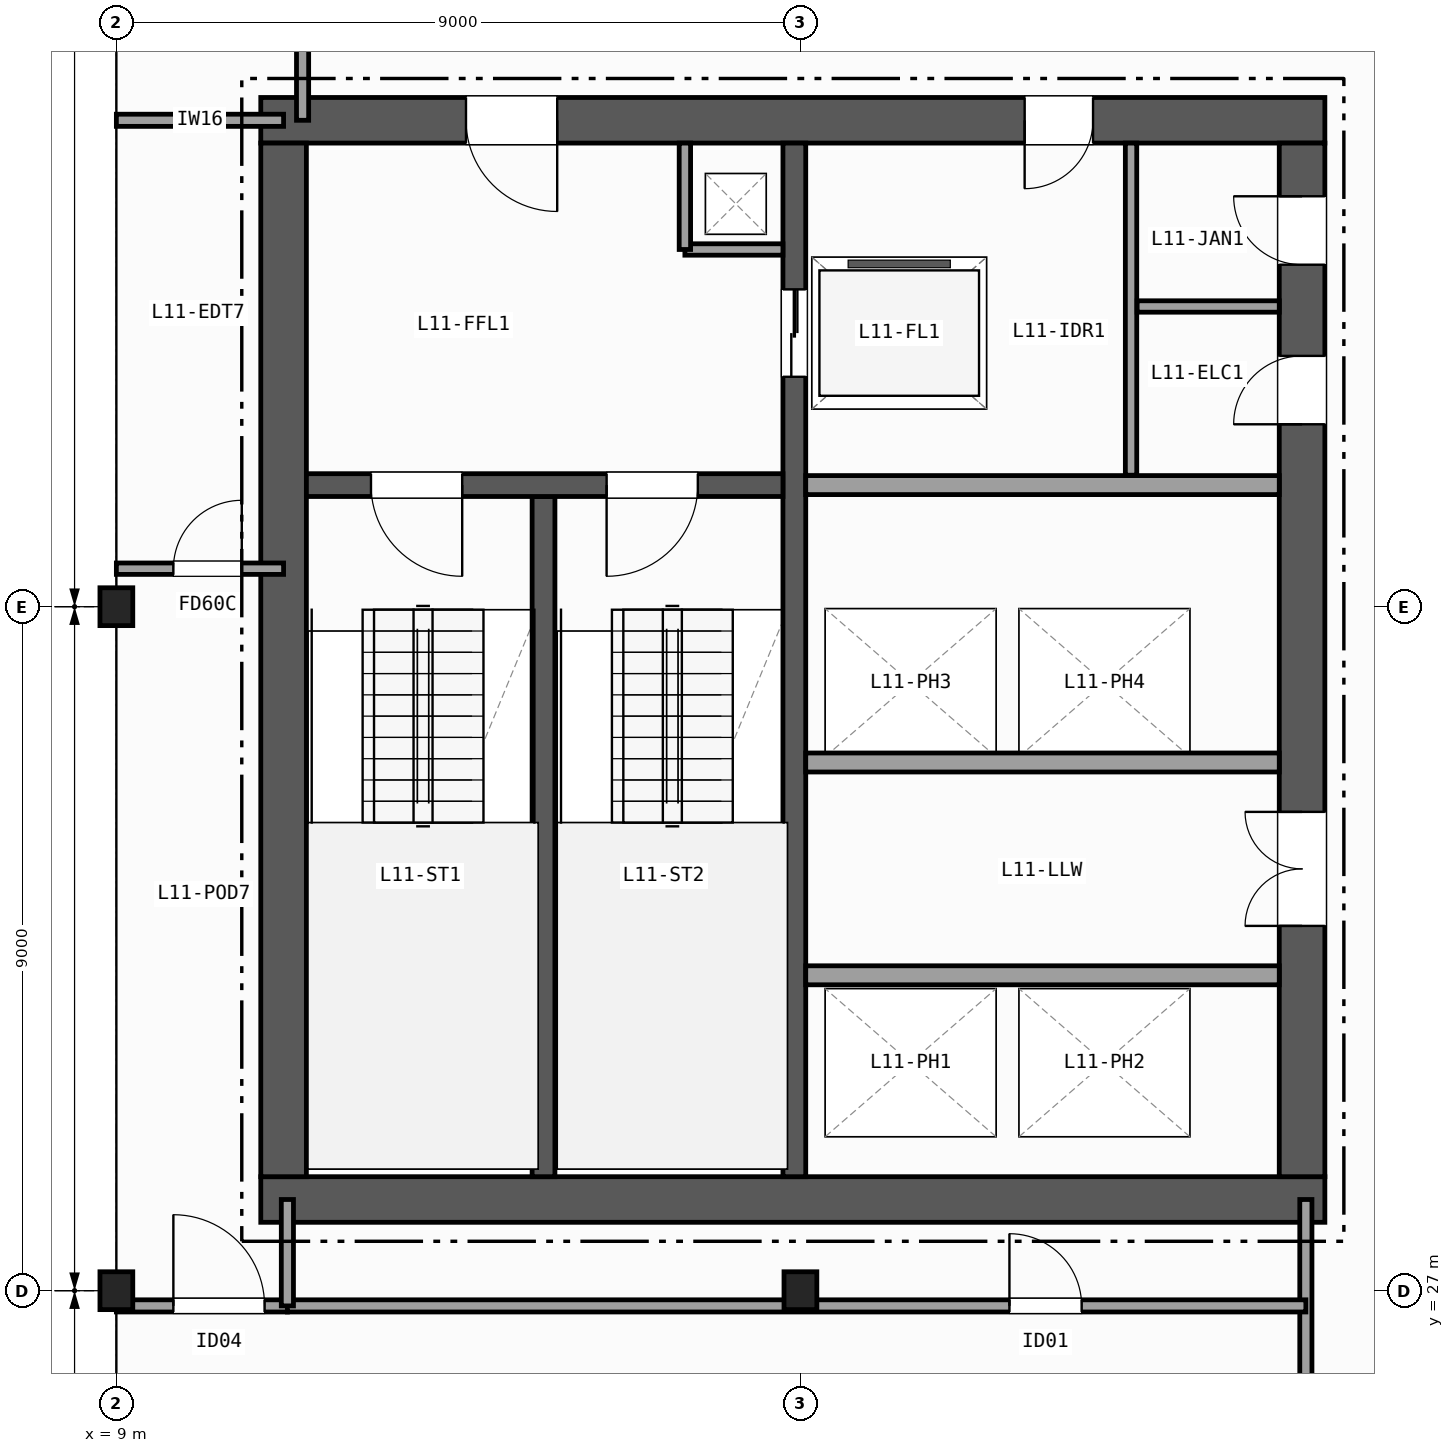
"""IFC4 building model, lengths in metres.
Left out: names, types, materials, properties, quantities, classifications, styles, units other than length and angle.
Written with IfcOpenShell. Run it as: python <this file> out.ifc"""

import sys

from ifc_helpers import new_model, si_unit, direction, frame, frame_2d, origin, origin_2d, place, context, subcontext, project, spatial, rectangle, i_section, extrude, element, fill, save


model = new_model("IFC4")
c1 = context("Model", 3, precision=1e-05, world=origin(), true_north=direction((0.0, 1.0)))
c2 = subcontext(c1, "Body", "Model", "MODEL_VIEW")
j1 = project(units=[si_unit("LENGTHUNIT", "METRE"), si_unit("PLANEANGLEUNIT", "RADIAN")], contexts=[c1])
p1 = place(None, origin())
s1 = spatial("IfcSite", under=j1, at=p1, CompositionType="ELEMENT")
p2 = place(p1, origin())
s2 = spatial("IfcBuilding", under=s1, at=p2, CompositionType="ELEMENT")
p3 = place(p2, frame((0.0, 0.0, 50.8)))
s3 = spatial("IfcBuildingStorey", under=s2, at=p3, CompositionType="ELEMENT", Elevation=50.8)
for number, where, z_axis, x_axis in (
    (1, (9.0, 27.0, 0.0), (0.0, 0.0, 1.0), (1.0, 0.0, 0.0)),
    (2, (9.0, 36.0, 0.0), (0.0, 0.0, 1.0), (1.0, 0.0, 0.0)),
    (3, (18.0, 27.0, 0.0), (0.0, 0.0, 1.0), (1.0, 0.0, 0.0)),
):
    element("IfcColumn", number, at=place(p3, frame(where, z_axis=z_axis, x_axis=x_axis)), inside=s3, PredefinedType="COLUMN", context=c2, shape_type="SweptSolid", body=[
        extrude(i_section(OverallWidth=0.432, OverallDepth=0.498, WebThickness=0.056, FlangeThickness=0.089, FilletRadius=0.015, at=origin_2d()), origin(), (0.0, 0.0, 1.0), 3.7),
    ])
p4 = place(p3, frame((10.9, 28.2, 0.0), z_axis=(0.0, 0.0, 1.0), x_axis=(1.0, 0.0, 0.0)))
e4 = element("IfcWall", 4, at=p4, inside=s3, PredefinedType="SHEAR", context=c2, shape_type="SweptSolid", body=[
    extrude(rectangle(XDim=14.0, YDim=0.6, at=frame_2d((7.0, 0.0))), origin(), (0.0, 0.0, 1.0), 3.42),
])
p5 = place(p3, frame((24.9, 42.4, 0.0), z_axis=(0.0, 0.0, 1.0), x_axis=(-1.0, 0.0, 0.0)))
e5 = element("IfcWall", 5, at=p5, inside=s3, PredefinedType="SHEAR", context=c2, shape_type="SweptSolid", body=[
    extrude(rectangle(XDim=14.0, YDim=0.6, at=frame_2d((7.0, 0.0))), origin(), (0.0, 0.0, 1.0), 3.42),
])
p6 = place(p5, frame((10.1, 0.0, 0.0)))
e6 = element("IfcOpeningElement", 6, at=p6, cuts=e5, PredefinedType="OPENING", context=c2, shape_type="SweptSolid", body=[
    extrude(rectangle(XDim=1.2, YDim=2.15, at=frame_2d((0.6, 1.075))), frame((0.0, 0.31, 0.0), z_axis=(0.0, -1.0, 0.0), x_axis=(1.0, 0.0, 0.0)), (0.0, 0.0, 1.0), 0.62),
])
p7 = place(p5, frame((3.05, 0.0, 0.0)))
e7 = element("IfcOpeningElement", 7, at=p7, cuts=e5, PredefinedType="OPENING", context=c2, shape_type="SweptSolid", body=[
    extrude(rectangle(XDim=0.9, YDim=2.1, at=frame_2d((0.45, 1.05))), frame((0.0, 0.31, 0.0), z_axis=(0.0, -1.0, 0.0), x_axis=(1.0, 0.0, 0.0)), (0.0, 0.0, 1.0), 0.62),
])
p8 = place(p3, frame((11.2, 42.1, 0.0), z_axis=(0.0, 0.0, 1.0), x_axis=(0.0, -1.0, 0.0)))
e8 = element("IfcWall", 8, at=p8, inside=s3, PredefinedType="SHEAR", context=c2, shape_type="SweptSolid", body=[
    extrude(rectangle(XDim=13.6, YDim=0.6, at=frame_2d((6.8, 0.0))), origin(), (0.0, 0.0, 1.0), 3.42),
])
p9 = place(p3, frame((24.6, 28.5, 0.0), z_axis=(0.0, 0.0, 1.0), x_axis=(0.0, 1.0, 0.0)))
e9 = element("IfcWall", 9, at=p9, inside=s3, PredefinedType="SHEAR", context=c2, shape_type="SweptSolid", body=[
    extrude(rectangle(XDim=13.6, YDim=0.6, at=frame_2d((6.8, 0.0))), origin(), (0.0, 0.0, 1.0), 3.42),
])
p10 = place(p9, frame((3.3, 0.0, 0.0)))
e10 = element("IfcOpeningElement", 10, at=p10, cuts=e9, PredefinedType="OPENING", context=c2, shape_type="SweptSolid", body=[
    extrude(rectangle(XDim=1.5, YDim=2.2, at=frame_2d((0.75, 1.1))), frame((0.0, 0.31, 0.0), z_axis=(0.0, -1.0, 0.0), x_axis=(1.0, 0.0, 0.0)), (0.0, 0.0, 1.0), 0.62),
])
p11 = place(p9, frame((9.9, 0.0, 0.0)))
e11 = element("IfcOpeningElement", 11, at=p11, cuts=e9, PredefinedType="OPENING", context=c2, shape_type="SweptSolid", body=[
    extrude(rectangle(XDim=0.9, YDim=2.1, at=frame_2d((0.45, 1.05))), frame((0.0, 0.31, 0.0), z_axis=(0.0, -1.0, 0.0), x_axis=(1.0, 0.0, 0.0)), (0.0, 0.0, 1.0), 0.62),
])
p12 = place(p9, frame((12.0, 0.0, 0.0)))
e12 = element("IfcOpeningElement", 12, at=p12, cuts=e9, PredefinedType="OPENING", context=c2, shape_type="SweptSolid", body=[
    extrude(rectangle(XDim=0.9, YDim=2.1, at=frame_2d((0.45, 1.05))), frame((0.0, 0.31, 0.0), z_axis=(0.0, -1.0, 0.0), x_axis=(1.0, 0.0, 0.0)), (0.0, 0.0, 1.0), 0.62),
])
p13 = place(p3, frame((14.62, 28.5, 0.0), z_axis=(0.0, 0.0, 1.0), x_axis=(0.0, 1.0, 0.0)))
e13 = element("IfcWall", 13, at=p13, inside=s3, PredefinedType="SHEAR", context=c2, shape_type="SweptSolid", body=[
    extrude(rectangle(XDim=8.95, YDim=0.3, at=frame_2d((4.475, 0.0))), origin(), (0.0, 0.0, 1.0), 3.42),
])
p14 = place(p3, frame((17.92, 42.1, 0.0), z_axis=(0.0, 0.0, 1.0), x_axis=(0.0, -1.0, 0.0)))
e14 = element("IfcWall", 14, at=p14, inside=s3, PredefinedType="SHEAR", context=c2, shape_type="SweptSolid", body=[
    extrude(rectangle(XDim=13.6, YDim=0.3, at=frame_2d((6.8, 0.0))), origin(), (0.0, 0.0, 1.0), 3.42),
])
p15 = place(p14, frame((1.925, 0.0, 0.0)))
e15 = element("IfcOpeningElement", 15, at=p15, cuts=e14, PredefinedType="OPENING", context=c2, shape_type="SweptSolid", body=[
    extrude(rectangle(XDim=1.15, YDim=2.15, at=frame_2d((0.575, 1.075))), frame((0.0, 0.16, 0.0), z_axis=(0.0, -1.0, 0.0), x_axis=(1.0, 0.0, 0.0)), (0.0, 0.0, 1.0), 0.32),
])
p16 = place(p3, frame((17.77, 37.6, 0.0), z_axis=(0.0, 0.0, 1.0), x_axis=(-1.0, 0.0, 0.0)))
e16 = element("IfcWall", 16, at=p16, inside=s3, PredefinedType="SHEAR", context=c2, shape_type="SweptSolid", body=[
    extrude(rectangle(XDim=6.27, YDim=0.3, at=frame_2d((3.135, 0.0))), origin(), (0.0, 0.0, 1.0), 3.42),
])
p17 = place(p16, frame((4.22, 0.0, 0.0)))
e17 = element("IfcOpeningElement", 17, at=p17, cuts=e16, PredefinedType="OPENING", context=c2, shape_type="SweptSolid", body=[
    extrude(rectangle(XDim=1.2, YDim=2.15, at=frame_2d((0.6, 1.075))), frame((0.0, 0.16, 0.0), z_axis=(0.0, -1.0, 0.0), x_axis=(1.0, 0.0, 0.0)), (0.0, 0.0, 1.0), 0.32),
])
p18 = place(p16, frame((1.12, 0.0, 0.0)))
e18 = element("IfcOpeningElement", 18, at=p18, cuts=e16, PredefinedType="OPENING", context=c2, shape_type="SweptSolid", body=[
    extrude(rectangle(XDim=1.2, YDim=2.15, at=frame_2d((0.6, 1.075))), frame((0.0, 0.16, 0.0), z_axis=(0.0, -1.0, 0.0), x_axis=(1.0, 0.0, 0.0)), (0.0, 0.0, 1.0), 0.32),
])
p19 = place(p3, frame((16.48, 40.7, 0.0), z_axis=(0.0, 0.0, 1.0), x_axis=(1.0, 0.0, 0.0)))
e19 = element("IfcWall", 19, at=p19, inside=s3, PredefinedType="PARTITIONING", context=c2, shape_type="SweptSolid", body=[
    extrude(rectangle(XDim=1.29, YDim=0.15, at=frame_2d((0.645, 0.0))), origin(), (0.0, 0.0, 1.0), 3.42),
])
p20 = place(p3, frame((16.48, 40.7, 0.0), z_axis=(0.0, 0.0, 1.0), x_axis=(0.0, 1.0, 0.0)))
e20 = element("IfcWall", 20, at=p20, inside=s3, PredefinedType="PARTITIONING", context=c2, shape_type="SweptSolid", body=[
    extrude(rectangle(XDim=1.4, YDim=0.15, at=frame_2d((0.7, 0.0))), origin(), (0.0, 0.0, 1.0), 3.42),
])
for number, where, z_axis, x_axis in (
    (21, (18.07, 37.6, 0.0), (0.0, 0.0, 1.0), (1.0, 0.0, 0.0)),
    (22, (18.07, 31.15, 0.0), (0.0, 0.0, 1.0), (1.0, 0.0, 0.0)),
    (23, (24.3, 33.95, 0.0), (0.0, 0.0, 1.0), (-1.0, 0.0, 0.0)),
):
    element("IfcWall", number, at=place(p3, frame(where, z_axis=z_axis, x_axis=x_axis)), inside=s3, PredefinedType="PARTITIONING", context=c2, shape_type="SweptSolid", body=[
        extrude(rectangle(XDim=6.23, YDim=0.25, at=frame_2d((3.115, 0.0))), origin(), (0.0, 0.0, 1.0), 3.42),
    ])
p21 = place(p3, frame((22.35, 37.73, 0.0), z_axis=(0.0, 0.0, 1.0), x_axis=(0.0, 1.0, 0.0)))
e24 = element("IfcWall", 24, at=p21, inside=s3, PredefinedType="PARTITIONING", context=c2, shape_type="SweptSolid", body=[
    extrude(rectangle(XDim=4.37, YDim=0.15, at=frame_2d((2.185, 0.0))), origin(), (0.0, 0.0, 1.0), 3.42),
])
p22 = place(p3, frame((22.43, 39.95, 0.0), z_axis=(0.0, 0.0, 1.0), x_axis=(1.0, 0.0, 0.0)))
e25 = element("IfcWall", 25, at=p22, inside=s3, PredefinedType="PARTITIONING", context=c2, shape_type="SweptSolid", body=[
    extrude(rectangle(XDim=1.87, YDim=0.15, at=frame_2d((0.935, 0.0))), origin(), (0.0, 0.0, 1.0), 3.42),
])
p23 = place(p3, frame((9.0, 26.8, 0.0), z_axis=(0.0, 0.0, 1.0), x_axis=(1.0, 0.0, 0.0)))
e26 = element("IfcWall", 26, at=p23, inside=s3, PredefinedType="PARTITIONING", context=c2, shape_type="SweptSolid", body=[
    extrude(rectangle(XDim=2.25, YDim=0.16, at=frame_2d((1.125, 0.0))), origin(), (0.0, 0.0, 1.0), 2.627),
])
p24 = place(p23, frame((0.75, 0.0, 0.0)))
e27 = element("IfcOpeningElement", 27, at=p24, cuts=e26, PredefinedType="OPENING", context=c2, shape_type="SweptSolid", body=[
    extrude(rectangle(XDim=1.2, YDim=2.15, at=frame_2d((0.6, 1.075))), frame((0.0, 0.09, 0.0), z_axis=(0.0, -1.0, 0.0), x_axis=(1.0, 0.0, 0.0)), (0.0, 0.0, 1.0), 0.18),
])
p25 = place(p3, frame((9.0, 42.4, 0.0), z_axis=(0.0, 0.0, 1.0), x_axis=(1.0, 0.0, 0.0)))
e28 = element("IfcWall", 28, at=p25, inside=s3, PredefinedType="PARTITIONING", context=c2, shape_type="SweptSolid", body=[
    extrude(rectangle(XDim=2.2, YDim=0.16, at=frame_2d((1.1, 0.0))), origin(), (0.0, 0.0, 1.0), 2.627),
])
p26 = place(p3, frame((11.45, 42.4, 0.0), z_axis=(0.0, 0.0, 1.0), x_axis=(0.0, 1.0, 0.0)))
e29 = element("IfcWall", 29, at=p26, inside=s3, PredefinedType="PARTITIONING", context=c2, shape_type="SweptSolid", body=[
    extrude(rectangle(XDim=2.1, YDim=0.16, at=frame_2d((1.05, 0.0))), origin(), (0.0, 0.0, 1.0), 3.42),
])
p27 = place(p3, frame((9.0, 36.5, 0.0), z_axis=(0.0, 0.0, 1.0), x_axis=(1.0, 0.0, 0.0)))
e30 = element("IfcWall", 30, at=p27, inside=s3, PredefinedType="PARTITIONING", context=c2, shape_type="SweptSolid", body=[
    extrude(rectangle(XDim=2.2, YDim=0.15, at=frame_2d((1.1, 0.0))), origin(), (0.0, 0.0, 1.0), 2.627),
])
p28 = place(p27, frame((0.75, 0.0, 0.0)))
e31 = element("IfcOpeningElement", 31, at=p28, cuts=e30, PredefinedType="OPENING", context=c2, shape_type="SweptSolid", body=[
    extrude(rectangle(XDim=0.9, YDim=2.1, at=frame_2d((0.45, 1.05))), frame((0.0, 0.085, 0.0), z_axis=(0.0, -1.0, 0.0), x_axis=(1.0, 0.0, 0.0)), (0.0, 0.0, 1.0), 0.17),
])
p29 = place(p3, frame((24.65, 9.0, 0.0), z_axis=(0.0, 0.0, 1.0), x_axis=(0.0, 1.0, 0.0)))
e32 = element("IfcWall", 32, at=p29, inside=s3, PredefinedType="PARTITIONING", context=c2, shape_type="SweptSolid", body=[
    extrude(rectangle(XDim=19.2, YDim=0.16, at=frame_2d((9.6, 0.0))), origin(), (0.0, 0.0, 1.0), 2.627),
])
p30 = place(p29, frame((12.2, 0.0, 0.0)))
e33 = element("IfcOpeningElement", 33, at=p30, cuts=e32, PredefinedType="OPENING", context=c2, shape_type="SweptSolid", body=[
    extrude(rectangle(XDim=1.0, YDim=2.1, at=frame_2d((0.5, 1.05))), frame((0.0, 0.09, 0.0), z_axis=(0.0, -1.0, 0.0), x_axis=(1.0, 0.0, 0.0)), (0.0, 0.0, 1.0), 0.18),
])
p31 = place(p29, frame((4.2, 0.0, 0.0)))
e34 = element("IfcOpeningElement", 34, at=p31, cuts=e32, PredefinedType="OPENING", context=c2, shape_type="SweptSolid", body=[
    extrude(rectangle(XDim=1.05, YDim=2.15, at=frame_2d((0.525, 1.075))), frame((0.0, 0.09, 0.0), z_axis=(0.0, -1.0, 0.0), x_axis=(1.0, 0.0, 0.0)), (0.0, 0.0, 1.0), 0.18),
])
p32 = place(p3, frame((11.25, 26.8, 0.0), z_axis=(0.0, 0.0, 1.0), x_axis=(1.0, 0.0, 0.0)))
e35 = element("IfcWall", 35, at=p32, inside=s3, PredefinedType="PARTITIONING", context=c2, shape_type="SweptSolid", body=[
    extrude(rectangle(XDim=13.4, YDim=0.16, at=frame_2d((6.7, 0.0))), origin(), (0.0, 0.0, 1.0), 2.789),
])
p33 = place(p32, frame((9.5, 0.0, 0.0)))
e36 = element("IfcOpeningElement", 36, at=p33, cuts=e35, PredefinedType="OPENING", context=c2, shape_type="SweptSolid", body=[
    extrude(rectangle(XDim=0.95, YDim=2.1, at=frame_2d((0.475, 1.05))), frame((0.0, 0.09, 0.0), z_axis=(0.0, -1.0, 0.0), x_axis=(1.0, 0.0, 0.0)), (0.0, 0.0, 1.0), 0.18),
])
p34 = place(p3, frame((11.25, 26.8, 0.0), z_axis=(0.0, 0.0, 1.0), x_axis=(0.0, 1.0, 0.0)))
e37 = element("IfcWall", 37, at=p34, inside=s3, PredefinedType="PARTITIONING", context=c2, shape_type="SweptSolid", body=[
    extrude(rectangle(XDim=1.4, YDim=0.16, at=frame_2d((0.7, 0.0))), origin(), (0.0, 0.0, 1.0), 2.789),
])
p35 = place(p17, origin())
e38 = element("IfcDoor", 38, at=p35, inside=s3, OperationType="SINGLE_SWING_LEFT", PredefinedType="DOOR", context=c2, shape_type="SweptSolid", body=[
    extrude(rectangle(XDim=1.2, YDim=2.15, at=frame_2d((0.6, 1.075))), frame((0.0, 0.025, 0.0), z_axis=(0.0, -1.0, 0.0), x_axis=(1.0, 0.0, 0.0)), (0.0, 0.0, 1.0), 0.05),
])
fill(e17, e38)
p36 = place(p18, origin())
e39 = element("IfcDoor", 39, at=p36, inside=s3, OperationType="SINGLE_SWING_RIGHT", PredefinedType="DOOR", context=c2, shape_type="SweptSolid", body=[
    extrude(rectangle(XDim=1.2, YDim=2.15, at=frame_2d((0.6, 1.075))), frame((0.0, 0.025, 0.0), z_axis=(0.0, -1.0, 0.0), x_axis=(1.0, 0.0, 0.0)), (0.0, 0.0, 1.0), 0.05),
])
fill(e18, e39)
p37 = place(p10, origin())
e40 = element("IfcDoor", 40, at=p37, inside=s3, OperationType="DOUBLE_DOOR_SINGLE_SWING", PredefinedType="DOOR", context=c2, shape_type="SweptSolid", body=[
    extrude(rectangle(XDim=1.5, YDim=2.2, at=frame_2d((0.75, 1.1))), frame((0.0, 0.025, 0.0), z_axis=(0.0, -1.0, 0.0), x_axis=(1.0, 0.0, 0.0)), (0.0, 0.0, 1.0), 0.05),
])
fill(e10, e40)
p38 = place(p6, origin())
e41 = element("IfcDoor", 41, at=p38, inside=s3, OperationType="SINGLE_SWING_LEFT", PredefinedType="DOOR", context=c2, shape_type="SweptSolid", body=[
    extrude(rectangle(XDim=1.2, YDim=2.15, at=frame_2d((0.6, 1.075))), frame((0.0, 0.025, 0.0), z_axis=(0.0, -1.0, 0.0), x_axis=(1.0, 0.0, 0.0)), (0.0, 0.0, 1.0), 0.05),
])
fill(e6, e41)
p39 = place(p11, origin())
e42 = element("IfcDoor", 42, at=p39, inside=s3, OperationType="SINGLE_SWING_LEFT", PredefinedType="DOOR", context=c2, shape_type="SweptSolid", body=[
    extrude(rectangle(XDim=0.9, YDim=2.1, at=frame_2d((0.45, 1.05))), frame((0.0, 0.025, 0.0), z_axis=(0.0, -1.0, 0.0), x_axis=(1.0, 0.0, 0.0)), (0.0, 0.0, 1.0), 0.05),
])
fill(e11, e42)
p40 = place(p7, origin())
e43 = element("IfcDoor", 43, at=p40, inside=s3, OperationType="SINGLE_SWING_RIGHT", PredefinedType="DOOR", context=c2, shape_type="SweptSolid", body=[
    extrude(rectangle(XDim=0.9, YDim=2.1, at=frame_2d((0.45, 1.05))), frame((0.0, 0.025, 0.0), z_axis=(0.0, -1.0, 0.0), x_axis=(1.0, 0.0, 0.0)), (0.0, 0.0, 1.0), 0.05),
])
fill(e7, e43)
p41 = place(p12, origin())
e44 = element("IfcDoor", 44, at=p41, inside=s3, OperationType="SINGLE_SWING_RIGHT", PredefinedType="DOOR", context=c2, shape_type="SweptSolid", body=[
    extrude(rectangle(XDim=0.9, YDim=2.1, at=frame_2d((0.45, 1.05))), frame((0.0, 0.025, 0.0), z_axis=(0.0, -1.0, 0.0), x_axis=(1.0, 0.0, 0.0)), (0.0, 0.0, 1.0), 0.05),
])
fill(e12, e44)
p42 = place(p15, origin())
e45 = element("IfcDoor", 45, at=p42, inside=s3, OperationType="DOUBLE_DOOR_SLIDING", PredefinedType="DOOR", context=c2, shape_type="SweptSolid", body=[
    extrude(rectangle(XDim=1.15, YDim=2.15, at=frame_2d((0.575, 1.075))), frame((0.0, 0.025, 0.0), z_axis=(0.0, -1.0, 0.0), x_axis=(1.0, 0.0, 0.0)), (0.0, 0.0, 1.0), 0.05),
])
fill(e15, e45)
p43 = place(p24, origin())
e46 = element("IfcDoor", 46, at=p43, inside=s3, OperationType="SINGLE_SWING_LEFT", PredefinedType="DOOR", context=c2, shape_type="SweptSolid", body=[
    extrude(rectangle(XDim=1.2, YDim=2.15, at=frame_2d((0.6, 1.075))), frame((0.0, 0.025, 0.0), z_axis=(0.0, -1.0, 0.0), x_axis=(1.0, 0.0, 0.0)), (0.0, 0.0, 1.0), 0.05),
])
fill(e27, e46)
p44 = place(p28, origin())
e47 = element("IfcDoor", 47, at=p44, inside=s3, OperationType="SINGLE_SWING_RIGHT", PredefinedType="DOOR", context=c2, shape_type="SweptSolid", body=[
    extrude(rectangle(XDim=0.9, YDim=2.1, at=frame_2d((0.45, 1.05))), frame((0.0, 0.025, 0.0), z_axis=(0.0, -1.0, 0.0), x_axis=(1.0, 0.0, 0.0)), (0.0, 0.0, 1.0), 0.05),
])
fill(e31, e47)
p45 = place(p33, origin())
e48 = element("IfcDoor", 48, at=p45, inside=s3, OperationType="SINGLE_SWING_LEFT", PredefinedType="DOOR", context=c2, shape_type="SweptSolid", body=[
    extrude(rectangle(XDim=0.95, YDim=2.1, at=frame_2d((0.475, 1.05))), frame((0.0, 0.025, 0.0), z_axis=(0.0, -1.0, 0.0), x_axis=(1.0, 0.0, 0.0)), (0.0, 0.0, 1.0), 0.05),
])
fill(e36, e48)
save(model, sys.argv[1])
